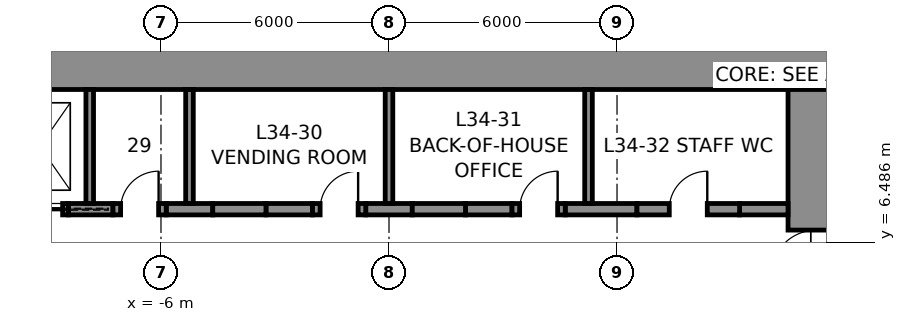
"""IFC4 building model, lengths in metres.
Left out: names, types, materials, properties, quantities, classifications, styles, units other than length and angle.
Written with IfcOpenShell. Run it as: python <this file> out.ifc"""

import sys

from ifc_helpers import new_model, si_unit, direction, frame, frame_2d, origin, place, context, subcontext, project, spatial, rectangle, extrude, element, fill, save


model = new_model("IFC4")
c1 = context("Model", 3, precision=1e-05, world=origin(), true_north=direction((0.0, 1.0)))
c2 = subcontext(c1, "Body", "Model", "MODEL_VIEW")
j1 = project(units=[si_unit("LENGTHUNIT", "METRE"), si_unit("PLANEANGLEUNIT", "RADIAN")], contexts=[c1])
p1 = place(None, origin())
s1 = spatial("IfcSite", under=j1, at=p1, CompositionType="ELEMENT")
p2 = place(p1, origin())
s2 = spatial("IfcBuilding", under=s1, at=p2, CompositionType="ELEMENT")
p3 = place(p2, frame((0.0, 0.0, 163.8)))
s3 = spatial("IfcBuildingStorey", under=s2, at=p3, CompositionType="ELEMENT", Elevation=163.8)
p4 = place(p3, frame((-12.0, 11.25, 0.0), z_axis=(0.0, 0.0, 1.0), x_axis=(1.0, 0.0, 0.0)))
e1 = element("IfcWall", 1, at=p4, inside=s3, PredefinedType="SHEAR", context=c2, shape_type="SweptSolid", body=[
    extrude(rectangle(XDim=24.0, YDim=1.5, at=frame_2d((12.0, 0.0))), origin(), (0.0, 0.0, 1.0), 4.0),
])
p5 = place(p3, frame((11.25, 10.5, 0.0), z_axis=(0.0, 0.0, 1.0), x_axis=(0.0, -1.0, 0.0)))
e2 = element("IfcWall", 2, at=p5, inside=s3, PredefinedType="SHEAR", context=c2, shape_type="SweptSolid", body=[
    extrude(rectangle(XDim=21.0, YDim=1.5, at=frame_2d((10.5, 0.0))), origin(), (0.0, 0.0, 1.0), 4.0),
])
p6 = place(p5, frame((3.7, 0.0, 0.0)))
e3 = element("IfcOpeningElement", 3, at=p6, cuts=e2, PredefinedType="OPENING", context=c2, shape_type="SweptSolid", body=[
    extrude(rectangle(XDim=1.2, YDim=2.3, at=frame_2d((0.6, 1.15))), frame((0.0, 0.76, 0.0), z_axis=(0.0, -1.0, 0.0), x_axis=(1.0, 0.0, 0.0)), (0.0, 0.0, 1.0), 1.52),
])
p7 = place(p5, frame((16.1, 0.0, 0.0)))
e4 = element("IfcOpeningElement", 4, at=p7, cuts=e2, PredefinedType="OPENING", context=c2, shape_type="SweptSolid", body=[
    extrude(rectangle(XDim=1.2, YDim=2.3, at=frame_2d((0.6, 1.15))), frame((0.0, 0.76, 0.0), z_axis=(0.0, -1.0, 0.0), x_axis=(1.0, 0.0, 0.0)), (0.0, 0.0, 1.0), 1.52),
])
p8 = place(p3, frame((-8.438, 7.35, 0.0), z_axis=(0.0, 0.0, 1.0), x_axis=(1.0, 0.0, 0.0)))
e5 = element("IfcWall", 5, at=p8, inside=s3, PredefinedType="SHEAR", context=c2, shape_type="SweptSolid", body=[
    extrude(rectangle(XDim=1.175, YDim=0.3, at=frame_2d((0.587, 0.0))), origin(), (0.0, 0.0, 1.0), 4.0),
])
for number, where, z_axis, x_axis in (
    (6, (-5.863, 7.35, 0.0), (0.0, 0.0, 1.0), (1.0, 0.0, 0.0)),
    (7, (-3.238, 7.35, 0.0), (0.0, 0.0, 1.0), (1.0, 0.0, 0.0)),
    (8, (-0.613, 7.35, 0.0), (0.0, 0.0, 1.0), (1.0, 0.0, 0.0)),
    (9, (2.012, 7.35, 0.0), (0.0, 0.0, 1.0), (1.0, 0.0, 0.0)),
):
    element("IfcWall", number, at=place(p3, frame(where, z_axis=z_axis, x_axis=x_axis)), inside=s3, PredefinedType="SHEAR", context=c2, shape_type="SweptSolid", body=[
        extrude(rectangle(XDim=1.225, YDim=0.3, at=frame_2d((0.613, 0.0))), origin(), (0.0, 0.0, 1.0), 4.0),
    ])
p9 = place(p3, frame((4.637, 7.35, 0.0), z_axis=(0.0, 0.0, 1.0), x_axis=(1.0, 0.0, 0.0)))
e10 = element("IfcWall", 10, at=p9, inside=s3, PredefinedType="SHEAR", context=c2, shape_type="SweptSolid", body=[
    extrude(rectangle(XDim=1.887, YDim=0.3, at=frame_2d((0.944, 0.0))), origin(), (0.0, 0.0, 1.0), 4.0),
])
p10 = place(p3, frame((9.225, 7.35, 0.0), z_axis=(0.0, 0.0, 1.0), x_axis=(1.0, 0.0, 0.0)))
e11 = element("IfcWall", 11, at=p10, inside=s3, PredefinedType="SHEAR", context=c2, shape_type="SweptSolid", body=[
    extrude(rectangle(XDim=1.275, YDim=0.3, at=frame_2d((0.637, 0.0))), origin(), (0.0, 0.0, 1.0), 4.0),
])
p11 = place(p3, frame((-9.938, 7.35, 0.0), z_axis=(0.0, 0.0, 1.0), x_axis=(1.0, 0.0, 0.0)))
e12 = element("IfcWall", 12, at=p11, inside=s3, PredefinedType="PARTITIONING", context=c2, shape_type="SweptSolid", body=[
    extrude(rectangle(XDim=1.5, YDim=0.3, at=frame_2d((0.75, 0.0))), origin(), (0.0, 0.0, 1.0), 4.0),
])
p12 = place(p11, frame((0.15, 0.0, 0.0)))
e13 = element("IfcOpeningElement", 13, at=p12, cuts=e12, PredefinedType="OPENING", context=c2, shape_type="SweptSolid", body=[
    extrude(rectangle(XDim=1.2, YDim=2.3, at=frame_2d((0.6, 1.15))), frame((0.0, 0.16, 0.0), z_axis=(0.0, -1.0, 0.0), x_axis=(1.0, 0.0, 0.0)), (0.0, 0.0, 1.0), 0.32),
])
p13 = place(p3, frame((-7.262, 7.35, 0.0), z_axis=(0.0, 0.0, 1.0), x_axis=(1.0, 0.0, 0.0)))
e14 = element("IfcWall", 14, at=p13, inside=s3, PredefinedType="PARTITIONING", context=c2, shape_type="SweptSolid", body=[
    extrude(rectangle(XDim=1.4, YDim=0.3, at=frame_2d((0.7, 0.0))), origin(), (0.0, 0.0, 1.0), 4.0),
])
p14 = place(p13, frame((0.2, 0.0, 0.0)))
e15 = element("IfcOpeningElement", 15, at=p14, cuts=e14, PredefinedType="OPENING", context=c2, shape_type="SweptSolid", body=[
    extrude(rectangle(XDim=1.0, YDim=2.3, at=frame_2d((0.5, 1.15))), frame((0.0, 0.16, 0.0), z_axis=(0.0, -1.0, 0.0), x_axis=(1.0, 0.0, 0.0)), (0.0, 0.0, 1.0), 0.32),
])
p15 = place(p3, frame((-4.637, 7.35, 0.0), z_axis=(0.0, 0.0, 1.0), x_axis=(1.0, 0.0, 0.0)))
e16 = element("IfcWall", 16, at=p15, inside=s3, PredefinedType="PARTITIONING", context=c2, shape_type="SweptSolid", body=[
    extrude(rectangle(XDim=1.4, YDim=0.3, at=frame_2d((0.7, 0.0))), origin(), (0.0, 0.0, 1.0), 4.0),
])
p16 = place(p3, frame((-2.012, 7.35, 0.0), z_axis=(0.0, 0.0, 1.0), x_axis=(1.0, 0.0, 0.0)))
e17 = element("IfcWall", 17, at=p16, inside=s3, PredefinedType="PARTITIONING", context=c2, shape_type="SweptSolid", body=[
    extrude(rectangle(XDim=1.4, YDim=0.3, at=frame_2d((0.7, 0.0))), origin(), (0.0, 0.0, 1.0), 4.0),
])
p17 = place(p16, frame((0.2, 0.0, 0.0)))
e18 = element("IfcOpeningElement", 18, at=p17, cuts=e17, PredefinedType="OPENING", context=c2, shape_type="SweptSolid", body=[
    extrude(rectangle(XDim=1.0, YDim=2.3, at=frame_2d((0.5, 1.15))), frame((0.0, 0.16, 0.0), z_axis=(0.0, -1.0, 0.0), x_axis=(1.0, 0.0, 0.0)), (0.0, 0.0, 1.0), 0.32),
])
p18 = place(p3, frame((0.613, 7.35, 0.0), z_axis=(0.0, 0.0, 1.0), x_axis=(1.0, 0.0, 0.0)))
e19 = element("IfcWall", 19, at=p18, inside=s3, PredefinedType="PARTITIONING", context=c2, shape_type="SweptSolid", body=[
    extrude(rectangle(XDim=1.4, YDim=0.3, at=frame_2d((0.7, 0.0))), origin(), (0.0, 0.0, 1.0), 4.0),
])
p19 = place(p3, frame((3.238, 7.35, 0.0), z_axis=(0.0, 0.0, 1.0), x_axis=(1.0, 0.0, 0.0)))
e20 = element("IfcWall", 20, at=p19, inside=s3, PredefinedType="PARTITIONING", context=c2, shape_type="SweptSolid", body=[
    extrude(rectangle(XDim=1.4, YDim=0.3, at=frame_2d((0.7, 0.0))), origin(), (0.0, 0.0, 1.0), 4.0),
])
p20 = place(p19, frame((0.2, 0.0, 0.0)))
e21 = element("IfcOpeningElement", 21, at=p20, cuts=e20, PredefinedType="OPENING", context=c2, shape_type="SweptSolid", body=[
    extrude(rectangle(XDim=1.0, YDim=2.3, at=frame_2d((0.5, 1.15))), frame((0.0, 0.16, 0.0), z_axis=(0.0, -1.0, 0.0), x_axis=(1.0, 0.0, 0.0)), (0.0, 0.0, 1.0), 0.32),
])
p21 = place(p3, frame((6.525, 7.35, 0.0), z_axis=(0.0, 0.0, 1.0), x_axis=(1.0, 0.0, 0.0)))
e22 = element("IfcWall", 22, at=p21, inside=s3, PredefinedType="PARTITIONING", context=c2, shape_type="SweptSolid", body=[
    extrude(rectangle(XDim=2.7, YDim=0.3, at=frame_2d((1.35, 0.0))), origin(), (0.0, 0.0, 1.0), 4.0),
])
p22 = place(p21, frame((0.85, 0.0, 0.0)))
e23 = element("IfcOpeningElement", 23, at=p22, cuts=e22, PredefinedType="OPENING", context=c2, shape_type="SweptSolid", body=[
    extrude(rectangle(XDim=1.0, YDim=2.3, at=frame_2d((0.5, 1.15))), frame((0.0, 0.16, 0.0), z_axis=(0.0, -1.0, 0.0), x_axis=(1.0, 0.0, 0.0)), (0.0, 0.0, 1.0), 0.32),
])
for number, where, z_axis, x_axis in (
    (24, (-7.875, 7.5, 0.0), (0.0, 0.0, 1.0), (0.0, 1.0, 0.0)),
    (25, (-5.25, 7.5, 0.0), (0.0, 0.0, 1.0), (0.0, 1.0, 0.0)),
    (26, (0.0, 7.5, 0.0), (0.0, 0.0, 1.0), (0.0, 1.0, 0.0)),
    (27, (5.25, 7.5, 0.0), (0.0, 0.0, 1.0), (0.0, 1.0, 0.0)),
):
    element("IfcWall", number, at=place(p3, frame(where, z_axis=z_axis, x_axis=x_axis)), inside=s3, PredefinedType="PARTITIONING", context=c2, shape_type="SweptSolid", body=[
        extrude(rectangle(XDim=3.0, YDim=0.2, at=frame_2d((1.5, 0.0))), origin(), (0.0, 0.0, 1.0), 4.0),
    ])
p23 = place(p14, origin())
e28 = element("IfcDoor", 28, at=p23, inside=s3, OperationType="SINGLE_SWING_RIGHT", PredefinedType="DOOR", context=c2, shape_type="SweptSolid", body=[
    extrude(rectangle(XDim=1.0, YDim=2.3, at=frame_2d((0.5, 1.15))), frame((0.0, 0.025, 0.0), z_axis=(0.0, -1.0, 0.0), x_axis=(1.0, 0.0, 0.0)), (0.0, 0.0, 1.0), 0.05),
])
fill(e15, e28)
p24 = place(p17, origin())
e29 = element("IfcDoor", 29, at=p24, inside=s3, OperationType="SINGLE_SWING_RIGHT", PredefinedType="DOOR", context=c2, shape_type="SweptSolid", body=[
    extrude(rectangle(XDim=1.0, YDim=2.3, at=frame_2d((0.5, 1.15))), frame((0.0, 0.025, 0.0), z_axis=(0.0, -1.0, 0.0), x_axis=(1.0, 0.0, 0.0)), (0.0, 0.0, 1.0), 0.05),
])
fill(e18, e29)
p25 = place(p20, origin())
e30 = element("IfcDoor", 30, at=p25, inside=s3, OperationType="SINGLE_SWING_RIGHT", PredefinedType="DOOR", context=c2, shape_type="SweptSolid", body=[
    extrude(rectangle(XDim=1.0, YDim=2.3, at=frame_2d((0.5, 1.15))), frame((0.0, 0.025, 0.0), z_axis=(0.0, -1.0, 0.0), x_axis=(1.0, 0.0, 0.0)), (0.0, 0.0, 1.0), 0.05),
])
fill(e21, e30)
p26 = place(p22, origin())
e31 = element("IfcDoor", 31, at=p26, inside=s3, OperationType="SINGLE_SWING_RIGHT", PredefinedType="DOOR", context=c2, shape_type="SweptSolid", body=[
    extrude(rectangle(XDim=1.0, YDim=2.3, at=frame_2d((0.5, 1.15))), frame((0.0, 0.025, 0.0), z_axis=(0.0, -1.0, 0.0), x_axis=(1.0, 0.0, 0.0)), (0.0, 0.0, 1.0), 0.05),
])
fill(e23, e31)
p27 = place(p6, frame((1.2, 0.0, 0.0), z_axis=(0.0, 0.0, 1.0), x_axis=(-1.0, 0.0, 0.0)))
e32 = element("IfcDoor", 32, at=p27, inside=s3, OperationType="SINGLE_SWING_LEFT", PredefinedType="DOOR", context=c2, shape_type="SweptSolid", body=[
    extrude(rectangle(XDim=1.2, YDim=2.3, at=frame_2d((0.6, 1.15))), frame((0.0, 0.025, 0.0), z_axis=(0.0, -1.0, 0.0), x_axis=(1.0, 0.0, 0.0)), (0.0, 0.0, 1.0), 0.05),
])
fill(e3, e32)
p28 = place(p12, frame((1.2, 0.0, 0.0), z_axis=(0.0, 0.0, 1.0), x_axis=(-1.0, 0.0, 0.0)))
e33 = element("IfcDoor", 33, at=p28, inside=s3, OperationType="SLIDING_TO_LEFT", PredefinedType="DOOR", context=c2, shape_type="SweptSolid", body=[
    extrude(rectangle(XDim=1.2, YDim=2.3, at=frame_2d((0.6, 1.15))), frame((0.0, 0.025, 0.0), z_axis=(0.0, -1.0, 0.0), x_axis=(1.0, 0.0, 0.0)), (0.0, 0.0, 1.0), 0.05),
])
fill(e13, e33)
save(model, sys.argv[1])
